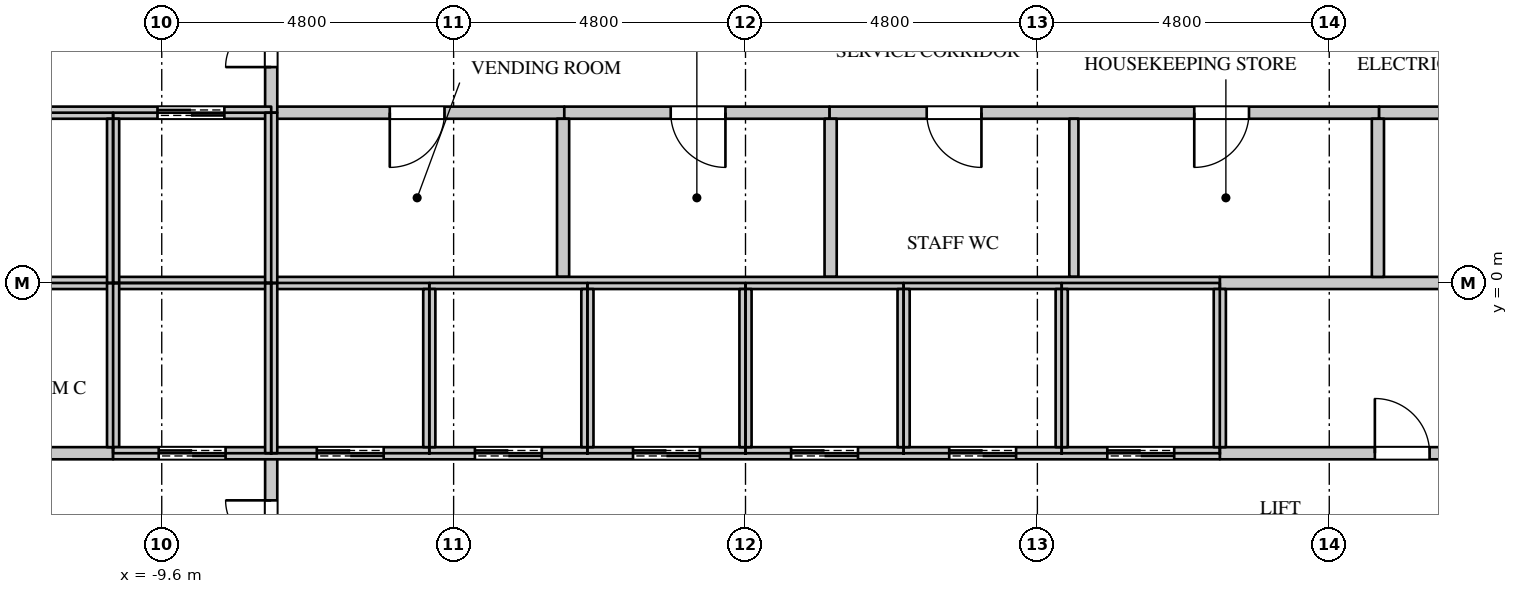
"""IFC4 building model, lengths in metres.
Left out: names, types, materials, properties, quantities, classifications, styles, units other than length and angle.
Written with IfcOpenShell. Run it as: python <this file> out.ifc"""

import sys

from ifc_helpers import new_model, si_unit, direction, frame, frame_2d, origin, place, context, subcontext, project, spatial, rectangle, extrude, element, fill, save


model = new_model("IFC4")
c1 = context("Model", 3, precision=1e-05, world=origin(), true_north=direction((0.0, 1.0)))
c2 = subcontext(c1, "Body", "Model", "MODEL_VIEW")
j1 = project(units=[si_unit("LENGTHUNIT", "METRE"), si_unit("PLANEANGLEUNIT", "RADIAN")], contexts=[c1])
p1 = place(None, origin())
s1 = spatial("IfcSite", under=j1, at=p1, CompositionType="ELEMENT")
p2 = place(p1, origin())
s2 = spatial("IfcBuilding", under=s1, at=p2, CompositionType="ELEMENT")
p3 = place(p2, frame((0.0, 0.0, 218.1)))
s3 = spatial("IfcBuildingStorey", under=s2, at=p3, CompositionType="ELEMENT", Elevation=218.1)
p4 = place(p3, frame((-7.8, 2.8, 0.0), z_axis=(0.0, 0.0, 1.0), x_axis=(1.0, 0.0, 0.0)))
e1 = element("IfcWall", 1, at=p4, inside=s3, PredefinedType="PARTITIONING", context=c2, shape_type="SweptSolid", body=[
    extrude(rectangle(XDim=4.82, YDim=0.2, at=frame_2d((2.41, 0.0))), origin(), (0.0, 0.0, 1.0), 3.95),
])
p5 = place(p4, frame((1.95, 0.0, 0.0)))
e2 = element("IfcOpeningElement", 2, at=p5, cuts=e1, PredefinedType="OPENING", context=c2, shape_type="SweptSolid", body=[
    extrude(rectangle(XDim=0.9, YDim=2.2, at=frame_2d((0.45, 1.1))), frame((0.0, 0.11, 0.0), z_axis=(0.0, -1.0, 0.0), x_axis=(1.0, 0.0, 0.0)), (0.0, 0.0, 1.0), 0.22),
])
p6 = place(p3, frame((-7.8, -8.075, 0.0), z_axis=(0.0, 0.0, 1.0), x_axis=(0.0, 1.0, 0.0)))
e3 = element("IfcWall", 3, at=p6, inside=s3, PredefinedType="PARTITIONING", context=c2, shape_type="SweptSolid", body=[
    extrude(rectangle(XDim=5.275, YDim=0.2, at=frame_2d((2.637, 0.0))), origin(), (0.0, 0.0, 1.0), 3.95),
])
p7 = place(p6, frame((3.0, 0.0, 0.0)))
e4 = element("IfcOpeningElement", 4, at=p7, cuts=e3, PredefinedType="OPENING", context=c2, shape_type="SweptSolid", body=[
    extrude(rectangle(XDim=1.5, YDim=2.4, at=frame_2d((0.75, 1.2))), frame((0.0, 0.11, 0.0), z_axis=(0.0, -1.0, 0.0), x_axis=(1.0, 0.0, 0.0)), (0.0, 0.0, 1.0), 0.22),
])
p8 = place(p3, frame((-7.8, 2.8, 0.0), z_axis=(0.0, 0.0, 1.0), x_axis=(0.0, 1.0, 0.0)))
e5 = element("IfcWall", 5, at=p8, inside=s3, PredefinedType="PARTITIONING", context=c2, shape_type="SweptSolid", body=[
    extrude(rectangle(XDim=5.275, YDim=0.2, at=frame_2d((2.637, 0.0))), origin(), (0.0, 0.0, 1.0), 3.95),
])
p9 = place(p8, frame((0.75, 0.0, 0.0)))
e6 = element("IfcOpeningElement", 6, at=p9, cuts=e5, PredefinedType="OPENING", context=c2, shape_type="SweptSolid", body=[
    extrude(rectangle(XDim=1.5, YDim=2.4, at=frame_2d((0.75, 1.2))), frame((0.0, 0.11, 0.0), z_axis=(0.0, -1.0, 0.0), x_axis=(1.0, 0.0, 0.0)), (0.0, 0.0, 1.0), 0.22),
])
p10 = place(p3, frame((1.38, 2.8, 0.0), z_axis=(0.0, 0.0, 1.0), x_axis=(1.0, 0.0, 0.0)))
e7 = element("IfcWall", 7, at=p10, inside=s3, PredefinedType="PARTITIONING", context=c2, shape_type="SweptSolid", body=[
    extrude(rectangle(XDim=9.04, YDim=0.2, at=frame_2d((4.52, 0.0))), origin(), (0.0, 0.0, 1.0), 3.95),
])
p11 = place(p10, frame((1.6, 0.0, 0.0)))
e8 = element("IfcOpeningElement", 8, at=p11, cuts=e7, PredefinedType="OPENING", context=c2, shape_type="SweptSolid", body=[
    extrude(rectangle(XDim=0.9, YDim=2.2, at=frame_2d((0.45, 1.1))), frame((0.0, 0.11, 0.0), z_axis=(0.0, -1.0, 0.0), x_axis=(1.0, 0.0, 0.0)), (0.0, 0.0, 1.0), 0.22),
])
p12 = place(p10, frame((6.0, 0.0, 0.0)))
e9 = element("IfcOpeningElement", 9, at=p12, cuts=e7, PredefinedType="OPENING", context=c2, shape_type="SweptSolid", body=[
    extrude(rectangle(XDim=0.9, YDim=2.2, at=frame_2d((0.45, 1.1))), frame((0.0, 0.11, 0.0), z_axis=(0.0, -1.0, 0.0), x_axis=(1.0, 0.0, 0.0)), (0.0, 0.0, 1.0), 0.22),
])
p13 = place(p3, frame((5.4, 0.1, 0.0), z_axis=(0.0, 0.0, 1.0), x_axis=(0.0, 1.0, 0.0)))
e10 = element("IfcWall", 10, at=p13, inside=s3, PredefinedType="PARTITIONING", context=c2, shape_type="SweptSolid", body=[
    extrude(rectangle(XDim=2.6, YDim=0.15, at=frame_2d((1.3, 0.0))), origin(), (0.0, 0.0, 1.0), 3.95),
])
p14 = place(p3, frame((-13.77, -2.8, 0.0), z_axis=(0.0, 0.0, 1.0), x_axis=(1.0, 0.0, 0.0)))
e11 = element("IfcWall", 11, at=p14, inside=s3, PredefinedType="PARTITIONING", context=c2, shape_type="SweptSolid", body=[
    extrude(rectangle(XDim=3.37, YDim=0.2, at=frame_2d((1.685, 0.0))), origin(), (0.0, 0.0, 1.0), 3.95),
])
p15 = place(p14, frame((1.35, 0.0, 0.0)))
e12 = element("IfcOpeningElement", 12, at=p15, cuts=e11, PredefinedType="OPENING", context=c2, shape_type="SweptSolid", body=[
    extrude(rectangle(XDim=0.6, YDim=2.0, at=frame_2d((0.3, 1.0))), frame((0.0, 0.11, 0.0), z_axis=(0.0, -1.0, 0.0), x_axis=(1.0, 0.0, 0.0)), (0.0, 0.0, 1.0), 0.22),
])
p16 = place(p3, frame((-2.98, 2.8, 0.0), z_axis=(0.0, 0.0, 1.0), x_axis=(1.0, 0.0, 0.0)))
e13 = element("IfcWall", 13, at=p16, inside=s3, PredefinedType="PARTITIONING", context=c2, shape_type="SweptSolid", body=[
    extrude(rectangle(XDim=4.36, YDim=0.2, at=frame_2d((2.18, 0.0))), origin(), (0.0, 0.0, 1.0), 3.95),
])
p17 = place(p16, frame((1.75, 0.0, 0.0)))
e14 = element("IfcOpeningElement", 14, at=p17, cuts=e13, PredefinedType="OPENING", context=c2, shape_type="SweptSolid", body=[
    extrude(rectangle(XDim=0.9, YDim=2.2, at=frame_2d((0.45, 1.1))), frame((0.0, 0.11, 0.0), z_axis=(0.0, -1.0, 0.0), x_axis=(1.0, 0.0, 0.0)), (0.0, 0.0, 1.0), 0.22),
])
for number, where, z_axis, x_axis in (
    (15, (-3.0, 0.1, 0.0), (0.0, 0.0, 1.0), (0.0, 1.0, 0.0)),
    (16, (1.4, 0.1, 0.0), (0.0, 0.0, 1.0), (0.0, 1.0, 0.0)),
):
    element("IfcWall", number, at=place(p3, frame(where, z_axis=z_axis, x_axis=x_axis)), inside=s3, PredefinedType="PARTITIONING", context=c2, shape_type="SweptSolid", body=[
        extrude(rectangle(XDim=2.6, YDim=0.2, at=frame_2d((1.3, 0.0))), origin(), (0.0, 0.0, 1.0), 3.95),
    ])
p18 = place(p3, frame((7.8, -2.8, 0.0), z_axis=(0.0, 0.0, 1.0), x_axis=(1.0, 0.0, 0.0)))
e17 = element("IfcWall", 17, at=p18, inside=s3, PredefinedType="PARTITIONING", context=c2, shape_type="SweptSolid", body=[
    extrude(rectangle(XDim=5.97, YDim=0.2, at=frame_2d((2.985, 0.0))), origin(), (0.0, 0.0, 1.0), 3.95),
])
p19 = place(p18, frame((2.55, 0.0, 0.0)))
e18 = element("IfcOpeningElement", 18, at=p19, cuts=e17, PredefinedType="OPENING", context=c2, shape_type="SweptSolid", body=[
    extrude(rectangle(XDim=0.9, YDim=2.2, at=frame_2d((0.45, 1.1))), frame((0.0, 0.11, 0.0), z_axis=(0.0, -1.0, 0.0), x_axis=(1.0, 0.0, 0.0)), (0.0, 0.0, 1.0), 0.22),
])
p20 = place(p3, frame((7.8, 0.0, 0.0), z_axis=(0.0, 0.0, 1.0), x_axis=(1.0, 0.0, 0.0)))
e19 = element("IfcWall", 19, at=p20, inside=s3, PredefinedType="PARTITIONING", context=c2, shape_type="SweptSolid", body=[
    extrude(rectangle(XDim=5.97, YDim=0.2, at=frame_2d((2.985, 0.0))), origin(), (0.0, 0.0, 1.0), 3.95),
])
p21 = place(p3, frame((10.42, 2.8, 0.0), z_axis=(0.0, 0.0, 1.0), x_axis=(1.0, 0.0, 0.0)))
e20 = element("IfcWall", 20, at=p21, inside=s3, PredefinedType="PARTITIONING", context=c2, shape_type="SweptSolid", body=[
    extrude(rectangle(XDim=3.35, YDim=0.2, at=frame_2d((1.675, 0.0))), origin(), (0.0, 0.0, 1.0), 3.95),
])
p22 = place(p21, frame((1.35, 0.0, 0.0)))
e21 = element("IfcOpeningElement", 21, at=p22, cuts=e20, PredefinedType="OPENING", context=c2, shape_type="SweptSolid", body=[
    extrude(rectangle(XDim=0.6, YDim=2.0, at=frame_2d((0.3, 1.0))), frame((0.0, 0.11, 0.0), z_axis=(0.0, -1.0, 0.0), x_axis=(1.0, 0.0, 0.0)), (0.0, 0.0, 1.0), 0.22),
])
p23 = place(p3, frame((10.4, 0.1, 0.0), z_axis=(0.0, 0.0, 1.0), x_axis=(0.0, 1.0, 0.0)))
e22 = element("IfcWall", 22, at=p23, inside=s3, PredefinedType="PARTITIONING", context=c2, shape_type="SweptSolid", body=[
    extrude(rectangle(XDim=2.6, YDim=0.2, at=frame_2d((1.3, 0.0))), origin(), (0.0, 0.0, 1.0), 3.95),
])
p24 = place(p3, frame((-13.77, 0.0, 0.0), z_axis=(0.0, 0.0, 1.0), x_axis=(1.0, 0.0, 0.0)))
e23 = element("IfcWall", 23, at=p24, inside=s3, PredefinedType="PARTITIONING", context=c2, shape_type="SweptSolid", body=[
    extrude(rectangle(XDim=21.57, YDim=0.2, at=frame_2d((10.785, 0.0))), origin(), (0.0, 0.0, 1.0), 3.95),
])
p25 = place(p3, frame((-13.77, 2.8, 0.0), z_axis=(0.0, 0.0, 1.0), x_axis=(1.0, 0.0, 0.0)))
e24 = element("IfcWall", 24, at=p25, inside=s3, PredefinedType="PARTITIONING", context=c2, shape_type="SweptSolid", body=[
    extrude(rectangle(XDim=5.97, YDim=0.2, at=frame_2d((2.985, 0.0))), origin(), (0.0, 0.0, 1.0), 3.95),
])
p26 = place(p25, frame((1.1, 0.0, 0.0)))
e25 = element("IfcOpeningElement", 25, at=p26, cuts=e24, PredefinedType="OPENING", context=c2, shape_type="SweptSolid", body=[
    extrude(rectangle(XDim=1.1, YDim=2.2, at=frame_2d((0.55, 1.1))), frame((0.0, 0.11, 0.0), z_axis=(0.0, -1.0, 0.0), x_axis=(1.0, 0.0, 0.0)), (0.0, 0.0, 1.0), 0.22),
])
p27 = place(p25, frame((4.1, 0.0, 0.0)))
e26 = element("IfcOpeningElement", 26, at=p27, cuts=e24, PredefinedType="OPENING", context=c2, shape_type="SweptSolid", body=[
    extrude(rectangle(XDim=1.1, YDim=2.2, at=frame_2d((0.55, 1.1))), frame((0.0, 0.11, 0.0), z_axis=(0.0, -1.0, 0.0), x_axis=(1.0, 0.0, 0.0)), (0.0, 0.0, 1.0), 0.22),
])
p28 = place(p3, frame((-10.4, -2.7, 0.0), z_axis=(0.0, 0.0, 1.0), x_axis=(0.0, 1.0, 0.0)))
e27 = element("IfcWall", 27, at=p28, inside=s3, PredefinedType="PARTITIONING", context=c2, shape_type="SweptSolid", body=[
    extrude(rectangle(XDim=2.7, YDim=0.2, at=frame_2d((1.35, 0.0))), origin(), (0.0, 0.0, 1.0), 3.95),
])
p29 = place(p3, frame((-10.4, -2.8, 0.0), z_axis=(0.0, 0.0, 1.0), x_axis=(1.0, 0.0, 0.0)))
e28 = element("IfcWall", 28, at=p29, inside=s3, PredefinedType="PARTITIONING", context=c2, shape_type="SweptSolid", body=[
    extrude(rectangle(XDim=18.2, YDim=0.2, at=frame_2d((9.1, 0.0))), origin(), (0.0, 0.0, 1.0), 3.95),
])
p30 = place(p29, frame((0.75, 0.0, 0.0)))
e29 = element("IfcOpeningElement", 29, at=p30, cuts=e28, PredefinedType="OPENING", context=c2, shape_type="SweptSolid", body=[
    extrude(rectangle(XDim=1.1, YDim=2.2, at=frame_2d((0.55, 1.1))), frame((0.0, 0.11, 0.0), z_axis=(0.0, -1.0, 0.0), x_axis=(1.0, 0.0, 0.0)), (0.0, 0.0, 1.0), 0.22),
])
p31 = place(p29, frame((3.35, 0.0, 0.0)))
e30 = element("IfcOpeningElement", 30, at=p31, cuts=e28, PredefinedType="OPENING", context=c2, shape_type="SweptSolid", body=[
    extrude(rectangle(XDim=1.1, YDim=2.2, at=frame_2d((0.55, 1.1))), frame((0.0, 0.11, 0.0), z_axis=(0.0, -1.0, 0.0), x_axis=(1.0, 0.0, 0.0)), (0.0, 0.0, 1.0), 0.22),
])
p32 = place(p29, frame((5.95, 0.0, 0.0)))
e31 = element("IfcOpeningElement", 31, at=p32, cuts=e28, PredefinedType="OPENING", context=c2, shape_type="SweptSolid", body=[
    extrude(rectangle(XDim=1.1, YDim=2.2, at=frame_2d((0.55, 1.1))), frame((0.0, 0.11, 0.0), z_axis=(0.0, -1.0, 0.0), x_axis=(1.0, 0.0, 0.0)), (0.0, 0.0, 1.0), 0.22),
])
p33 = place(p29, frame((8.55, 0.0, 0.0)))
e32 = element("IfcOpeningElement", 32, at=p33, cuts=e28, PredefinedType="OPENING", context=c2, shape_type="SweptSolid", body=[
    extrude(rectangle(XDim=1.1, YDim=2.2, at=frame_2d((0.55, 1.1))), frame((0.0, 0.11, 0.0), z_axis=(0.0, -1.0, 0.0), x_axis=(1.0, 0.0, 0.0)), (0.0, 0.0, 1.0), 0.22),
])
p34 = place(p29, frame((11.15, 0.0, 0.0)))
e33 = element("IfcOpeningElement", 33, at=p34, cuts=e28, PredefinedType="OPENING", context=c2, shape_type="SweptSolid", body=[
    extrude(rectangle(XDim=1.1, YDim=2.2, at=frame_2d((0.55, 1.1))), frame((0.0, 0.11, 0.0), z_axis=(0.0, -1.0, 0.0), x_axis=(1.0, 0.0, 0.0)), (0.0, 0.0, 1.0), 0.22),
])
p35 = place(p29, frame((13.75, 0.0, 0.0)))
e34 = element("IfcOpeningElement", 34, at=p35, cuts=e28, PredefinedType="OPENING", context=c2, shape_type="SweptSolid", body=[
    extrude(rectangle(XDim=1.1, YDim=2.2, at=frame_2d((0.55, 1.1))), frame((0.0, 0.11, 0.0), z_axis=(0.0, -1.0, 0.0), x_axis=(1.0, 0.0, 0.0)), (0.0, 0.0, 1.0), 0.22),
])
p36 = place(p29, frame((16.35, 0.0, 0.0)))
e35 = element("IfcOpeningElement", 35, at=p36, cuts=e28, PredefinedType="OPENING", context=c2, shape_type="SweptSolid", body=[
    extrude(rectangle(XDim=1.1, YDim=2.2, at=frame_2d((0.55, 1.1))), frame((0.0, 0.11, 0.0), z_axis=(0.0, -1.0, 0.0), x_axis=(1.0, 0.0, 0.0)), (0.0, 0.0, 1.0), 0.22),
])
p37 = place(p3, frame((-10.4, 0.0, 0.0), z_axis=(0.0, 0.0, 1.0), x_axis=(0.0, 1.0, 0.0)))
e36 = element("IfcWall", 36, at=p37, inside=s3, PredefinedType="PARTITIONING", context=c2, shape_type="SweptSolid", body=[
    extrude(rectangle(XDim=2.7, YDim=0.2, at=frame_2d((1.35, 0.0))), origin(), (0.0, 0.0, 1.0), 3.95),
])
for number, where, z_axis, x_axis in (
    (37, (-7.8, -2.8, 0.0), (0.0, 0.0, 1.0), (0.0, 1.0, 0.0)),
    (38, (-7.8, 0.0, 0.0), (0.0, 0.0, 1.0), (0.0, 1.0, 0.0)),
):
    element("IfcWall", number, at=place(p3, frame(where, z_axis=z_axis, x_axis=x_axis)), inside=s3, PredefinedType="PARTITIONING", context=c2, shape_type="SweptSolid", body=[
        extrude(rectangle(XDim=2.8, YDim=0.2, at=frame_2d((1.4, 0.0))), origin(), (0.0, 0.0, 1.0), 3.95),
    ])
for number, where, z_axis, x_axis in (
    (39, (-5.2, -2.7, 0.0), (0.0, 0.0, 1.0), (0.0, 1.0, 0.0)),
    (40, (-2.6, -2.7, 0.0), (0.0, 0.0, 1.0), (0.0, 1.0, 0.0)),
    (41, (0.0, -2.7, 0.0), (0.0, 0.0, 1.0), (0.0, 1.0, 0.0)),
    (42, (2.6, -2.7, 0.0), (0.0, 0.0, 1.0), (0.0, 1.0, 0.0)),
    (43, (5.2, -2.7, 0.0), (0.0, 0.0, 1.0), (0.0, 1.0, 0.0)),
    (44, (7.8, -2.7, 0.0), (0.0, 0.0, 1.0), (0.0, 1.0, 0.0)),
):
    element("IfcWall", number, at=place(p3, frame(where, z_axis=z_axis, x_axis=x_axis)), inside=s3, PredefinedType="PARTITIONING", context=c2, shape_type="SweptSolid", body=[
        extrude(rectangle(XDim=2.6, YDim=0.2, at=frame_2d((1.3, 0.0))), origin(), (0.0, 0.0, 1.0), 3.95),
    ])
p38 = place(p19, origin())
e45 = element("IfcDoor", 45, at=p38, inside=s3, OperationType="SINGLE_SWING_LEFT", PredefinedType="DOOR", context=c2, shape_type="SweptSolid", body=[
    extrude(rectangle(XDim=0.9, YDim=2.2, at=frame_2d((0.45, 1.1))), frame((0.0, 0.025, 0.0), z_axis=(0.0, -1.0, 0.0), x_axis=(1.0, 0.0, 0.0)), (0.0, 0.0, 1.0), 0.05),
])
fill(e18, e45)
p39 = place(p5, origin())
e46 = element("IfcDoor", 46, at=p39, inside=s3, OperationType="SINGLE_SWING_RIGHT", PredefinedType="DOOR", context=c2, shape_type="SweptSolid", body=[
    extrude(rectangle(XDim=0.9, YDim=2.2, at=frame_2d((0.45, 1.1))), frame((0.0, 0.025, 0.0), z_axis=(0.0, -1.0, 0.0), x_axis=(1.0, 0.0, 0.0)), (0.0, 0.0, 1.0), 0.05),
])
fill(e2, e46)
p40 = place(p17, origin())
e47 = element("IfcDoor", 47, at=p40, inside=s3, OperationType="SINGLE_SWING_LEFT", PredefinedType="DOOR", context=c2, shape_type="SweptSolid", body=[
    extrude(rectangle(XDim=0.9, YDim=2.2, at=frame_2d((0.45, 1.1))), frame((0.0, 0.025, 0.0), z_axis=(0.0, -1.0, 0.0), x_axis=(1.0, 0.0, 0.0)), (0.0, 0.0, 1.0), 0.05),
])
fill(e14, e47)
p41 = place(p11, origin())
e48 = element("IfcDoor", 48, at=p41, inside=s3, OperationType="SINGLE_SWING_LEFT", PredefinedType="DOOR", context=c2, shape_type="SweptSolid", body=[
    extrude(rectangle(XDim=0.9, YDim=2.2, at=frame_2d((0.45, 1.1))), frame((0.0, 0.025, 0.0), z_axis=(0.0, -1.0, 0.0), x_axis=(1.0, 0.0, 0.0)), (0.0, 0.0, 1.0), 0.05),
])
fill(e8, e48)
p42 = place(p12, origin())
e49 = element("IfcDoor", 49, at=p42, inside=s3, OperationType="SINGLE_SWING_RIGHT", PredefinedType="DOOR", context=c2, shape_type="SweptSolid", body=[
    extrude(rectangle(XDim=0.9, YDim=2.2, at=frame_2d((0.45, 1.1))), frame((0.0, 0.025, 0.0), z_axis=(0.0, -1.0, 0.0), x_axis=(1.0, 0.0, 0.0)), (0.0, 0.0, 1.0), 0.05),
])
fill(e9, e49)
p43 = place(p27, origin())
e50 = element("IfcDoor", 50, at=p43, inside=s3, OperationType="DOUBLE_DOOR_SLIDING", PredefinedType="DOOR", context=c2, shape_type="SweptSolid", body=[
    extrude(rectangle(XDim=1.1, YDim=2.2, at=frame_2d((0.55, 1.1))), frame((0.0, 0.025, 0.0), z_axis=(0.0, -1.0, 0.0), x_axis=(1.0, 0.0, 0.0)), (0.0, 0.0, 1.0), 0.05),
])
fill(e26, e50)
p44 = place(p30, origin())
e51 = element("IfcDoor", 51, at=p44, inside=s3, OperationType="DOUBLE_DOOR_SLIDING", PredefinedType="DOOR", context=c2, shape_type="SweptSolid", body=[
    extrude(rectangle(XDim=1.1, YDim=2.2, at=frame_2d((0.55, 1.1))), frame((0.0, 0.025, 0.0), z_axis=(0.0, -1.0, 0.0), x_axis=(1.0, 0.0, 0.0)), (0.0, 0.0, 1.0), 0.05),
])
fill(e29, e51)
p45 = place(p31, origin())
e52 = element("IfcDoor", 52, at=p45, inside=s3, OperationType="DOUBLE_DOOR_SLIDING", PredefinedType="DOOR", context=c2, shape_type="SweptSolid", body=[
    extrude(rectangle(XDim=1.1, YDim=2.2, at=frame_2d((0.55, 1.1))), frame((0.0, 0.025, 0.0), z_axis=(0.0, -1.0, 0.0), x_axis=(1.0, 0.0, 0.0)), (0.0, 0.0, 1.0), 0.05),
])
fill(e30, e52)
p46 = place(p32, origin())
e53 = element("IfcDoor", 53, at=p46, inside=s3, OperationType="DOUBLE_DOOR_SLIDING", PredefinedType="DOOR", context=c2, shape_type="SweptSolid", body=[
    extrude(rectangle(XDim=1.1, YDim=2.2, at=frame_2d((0.55, 1.1))), frame((0.0, 0.025, 0.0), z_axis=(0.0, -1.0, 0.0), x_axis=(1.0, 0.0, 0.0)), (0.0, 0.0, 1.0), 0.05),
])
fill(e31, e53)
p47 = place(p33, origin())
e54 = element("IfcDoor", 54, at=p47, inside=s3, OperationType="DOUBLE_DOOR_SLIDING", PredefinedType="DOOR", context=c2, shape_type="SweptSolid", body=[
    extrude(rectangle(XDim=1.1, YDim=2.2, at=frame_2d((0.55, 1.1))), frame((0.0, 0.025, 0.0), z_axis=(0.0, -1.0, 0.0), x_axis=(1.0, 0.0, 0.0)), (0.0, 0.0, 1.0), 0.05),
])
fill(e32, e54)
p48 = place(p34, origin())
e55 = element("IfcDoor", 55, at=p48, inside=s3, OperationType="DOUBLE_DOOR_SLIDING", PredefinedType="DOOR", context=c2, shape_type="SweptSolid", body=[
    extrude(rectangle(XDim=1.1, YDim=2.2, at=frame_2d((0.55, 1.1))), frame((0.0, 0.025, 0.0), z_axis=(0.0, -1.0, 0.0), x_axis=(1.0, 0.0, 0.0)), (0.0, 0.0, 1.0), 0.05),
])
fill(e33, e55)
p49 = place(p35, origin())
e56 = element("IfcDoor", 56, at=p49, inside=s3, OperationType="DOUBLE_DOOR_SLIDING", PredefinedType="DOOR", context=c2, shape_type="SweptSolid", body=[
    extrude(rectangle(XDim=1.1, YDim=2.2, at=frame_2d((0.55, 1.1))), frame((0.0, 0.025, 0.0), z_axis=(0.0, -1.0, 0.0), x_axis=(1.0, 0.0, 0.0)), (0.0, 0.0, 1.0), 0.05),
])
fill(e34, e56)
p50 = place(p36, origin())
e57 = element("IfcDoor", 57, at=p50, inside=s3, OperationType="DOUBLE_DOOR_SLIDING", PredefinedType="DOOR", context=c2, shape_type="SweptSolid", body=[
    extrude(rectangle(XDim=1.1, YDim=2.2, at=frame_2d((0.55, 1.1))), frame((0.0, 0.025, 0.0), z_axis=(0.0, -1.0, 0.0), x_axis=(1.0, 0.0, 0.0)), (0.0, 0.0, 1.0), 0.05),
])
fill(e35, e57)
p51 = place(p9, origin())
e58 = element("IfcDoor", 58, at=p51, inside=s3, OperationType="DOUBLE_DOOR_SINGLE_SWING", PredefinedType="DOOR", context=c2, shape_type="SweptSolid", body=[
    extrude(rectangle(XDim=1.5, YDim=2.4, at=frame_2d((0.75, 1.2))), frame((0.0, 0.025, 0.0), z_axis=(0.0, -1.0, 0.0), x_axis=(1.0, 0.0, 0.0)), (0.0, 0.0, 1.0), 0.05),
])
fill(e6, e58)
p52 = place(p7, origin())
e59 = element("IfcDoor", 59, at=p52, inside=s3, OperationType="DOUBLE_DOOR_SINGLE_SWING", PredefinedType="DOOR", context=c2, shape_type="SweptSolid", body=[
    extrude(rectangle(XDim=1.5, YDim=2.4, at=frame_2d((0.75, 1.2))), frame((0.0, 0.025, 0.0), z_axis=(0.0, -1.0, 0.0), x_axis=(1.0, 0.0, 0.0)), (0.0, 0.0, 1.0), 0.05),
])
fill(e4, e59)
save(model, sys.argv[1])
